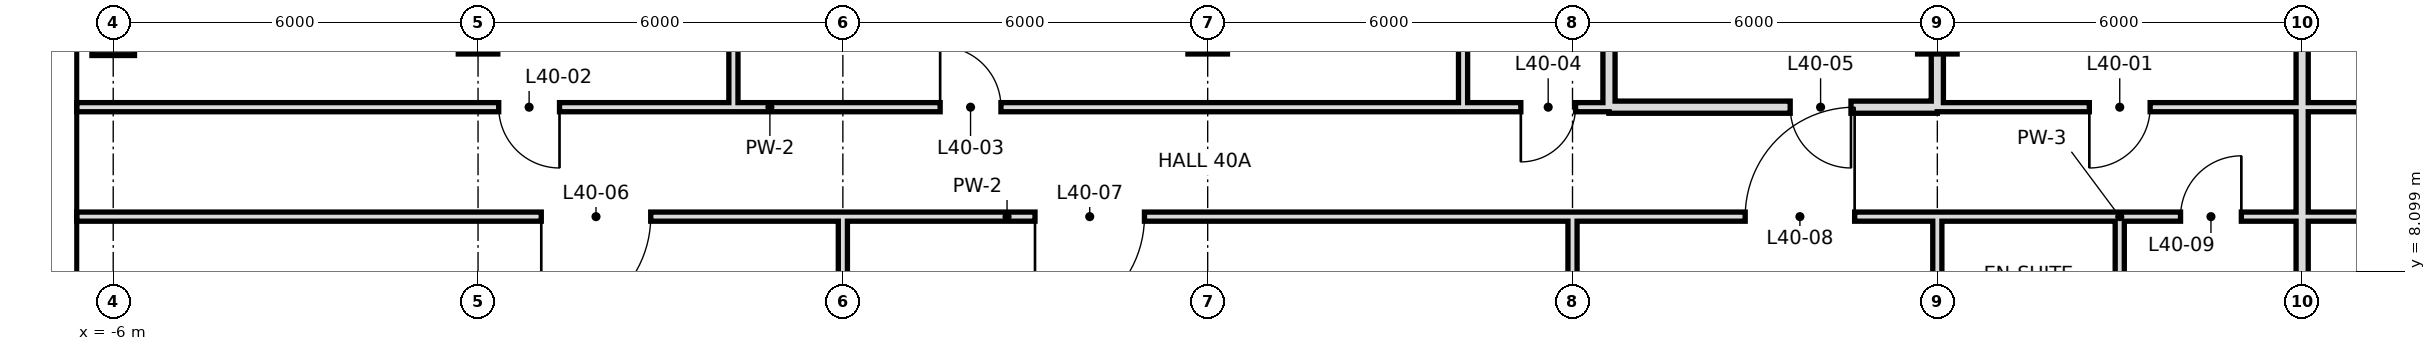
"""IFC4 building model, lengths in metres.
Left out: names, types, materials, properties, quantities, classifications, styles, units other than length and angle.
Written with IfcOpenShell. Run it as: python <this file> out.ifc"""

import sys

from ifc_helpers import new_model, si_unit, direction, frame, frame_2d, origin, origin_2d, place, context, subcontext, project, spatial, rectangle, hollow_rectangle, extrude, element, fill, save


model = new_model("IFC4")
c1 = context("Model", 3, precision=1e-05, world=origin(), true_north=direction((0.0, 1.0)))
c2 = subcontext(c1, "Body", "Model", "MODEL_VIEW")
j1 = project(units=[si_unit("LENGTHUNIT", "METRE"), si_unit("PLANEANGLEUNIT", "RADIAN")], contexts=[c1])
p1 = place(None, origin())
s1 = spatial("IfcSite", under=j1, at=p1, CompositionType="ELEMENT")
p2 = place(p1, origin())
s2 = spatial("IfcBuilding", under=s1, at=p2, CompositionType="ELEMENT")
p3 = place(p2, frame((0.0, 0.0, 174.4)))
s3 = spatial("IfcBuildingStorey", under=s2, at=p3, CompositionType="ELEMENT", Elevation=174.4)
p4 = place(p3, frame((-6.0, 12.0, 0.0), z_axis=(0.0, 0.0, 1.0), x_axis=(1.0, 0.0, 0.0)))
e1 = element("IfcColumn", 1, at=p4, inside=s3, PredefinedType="COLUMN", context=c2, shape_type="SweptSolid", body=[
    extrude(hollow_rectangle(XDim=0.7, YDim=0.7, WallThickness=0.036, at=origin_2d()), origin(), (0.0, 0.0, 1.0), 3.6),
])
for number, where, z_axis, x_axis in (
    (2, (0.0, 12.0, 0.0), (0.0, 0.0, 1.0), (1.0, 0.0, 0.0)),
    (3, (12.0, 12.0, 0.0), (0.0, 0.0, 1.0), (1.0, 0.0, 0.0)),
    (4, (24.0, 12.0, 0.0), (0.0, 0.0, 1.0), (1.0, 0.0, 0.0)),
):
    element("IfcColumn", number, at=place(p3, frame(where, z_axis=z_axis, x_axis=x_axis)), inside=s3, PredefinedType="COLUMN", context=c2, shape_type="SweptSolid", body=[
        extrude(hollow_rectangle(XDim=0.65, YDim=0.65, WallThickness=0.032, at=origin_2d()), origin(), (0.0, 0.0, 1.0), 3.6),
    ])
p5 = place(p3, frame((16.2, 10.8, 0.0), z_axis=(0.0, 0.0, 1.0), x_axis=(0.0, 1.0, 0.0)))
e5 = element("IfcWall", 5, at=p5, inside=s3, PredefinedType="PARTITIONING", context=c2, shape_type="SweptSolid", body=[
    extrude(rectangle(XDim=4.5, YDim=0.15, at=frame_2d((2.25, 0.0))), origin(), (0.0, 0.0, 1.0), 3.42),
])
p6 = place(p3, frame((18.0, -0.6, 0.0), z_axis=(0.0, 0.0, 1.0), x_axis=(0.0, 1.0, 0.0)))
e6 = element("IfcWall", 6, at=p6, inside=s3, PredefinedType="PARTITIONING", context=c2, shape_type="SweptSolid", body=[
    extrude(rectangle(XDim=9.6, YDim=0.15, at=frame_2d((4.8, 0.0))), origin(), (0.0, 0.0, 1.0), 2.72),
])
for number, where, z_axis, x_axis in (
    (7, (18.6, 10.8, 0.0), (0.0, 0.0, 1.0), (0.0, 1.0, 0.0)),
    (8, (24.0, 10.8, 0.0), (0.0, 0.0, 1.0), (0.0, 1.0, 0.0)),
):
    element("IfcWall", number, at=place(p3, frame(where, z_axis=z_axis, x_axis=x_axis)), inside=s3, PredefinedType="SOLIDWALL", context=c2, shape_type="SweptSolid", body=[
        extrude(rectangle(XDim=4.5, YDim=0.2, at=frame_2d((2.25, 0.0))), origin(), (0.0, 0.0, 1.0), 2.72),
    ])
p7 = place(p3, frame((24.0, 6.0, 0.0), z_axis=(0.0, 0.0, 1.0), x_axis=(0.0, 1.0, 0.0)))
e9 = element("IfcWall", 9, at=p7, inside=s3, PredefinedType="PARTITIONING", context=c2, shape_type="SweptSolid", body=[
    extrude(rectangle(XDim=3.0, YDim=0.15, at=frame_2d((1.5, 0.0))), origin(), (0.0, 0.0, 1.0), 2.72),
])
p8 = place(p3, frame((27.0, 6.0, 0.0), z_axis=(0.0, 0.0, 1.0), x_axis=(0.0, 1.0, 0.0)))
e10 = element("IfcWall", 10, at=p8, inside=s3, PredefinedType="PARTITIONING", context=c2, shape_type="SweptSolid", body=[
    extrude(rectangle(XDim=3.0, YDim=0.15, at=frame_2d((1.5, 0.0))), origin(), (0.0, 0.0, 1.0), 3.42),
])
p9 = place(p3, frame((30.0, -0.6, 0.0), z_axis=(0.0, 0.0, 1.0), x_axis=(0.0, 1.0, 0.0)))
e11 = element("IfcWall", 11, at=p9, inside=s3, PredefinedType="SOLIDWALL", context=c2, shape_type="SweptSolid", body=[
    extrude(rectangle(XDim=15.9, YDim=0.2, at=frame_2d((7.95, 0.0))), origin(), (0.0, 0.0, 1.0), 2.72),
])
p10 = place(p3, frame((4.2, 10.8, 0.0), z_axis=(0.0, 0.0, 1.0), x_axis=(0.0, 1.0, 0.0)))
e12 = element("IfcWall", 12, at=p10, inside=s3, PredefinedType="PARTITIONING", context=c2, shape_type="SweptSolid", body=[
    extrude(rectangle(XDim=4.5, YDim=0.15, at=frame_2d((2.25, 0.0))), origin(), (0.0, 0.0, 1.0), 3.42),
])
p11 = place(p3, frame((6.0, -0.6, 0.0), z_axis=(0.0, 0.0, 1.0), x_axis=(0.0, 1.0, 0.0)))
e13 = element("IfcWall", 13, at=p11, inside=s3, PredefinedType="PARTITIONING", context=c2, shape_type="SweptSolid", body=[
    extrude(rectangle(XDim=9.6, YDim=0.15, at=frame_2d((4.8, 0.0))), origin(), (0.0, 0.0, 1.0), 2.72),
])
p12 = place(p3, frame((18.6, 10.8, 0.0), z_axis=(0.0, 0.0, 1.0), x_axis=(1.0, 0.0, 0.0)))
e14 = element("IfcWall", 14, at=p12, inside=s3, PredefinedType="SOLIDWALL", context=c2, shape_type="SweptSolid", body=[
    extrude(rectangle(XDim=5.4, YDim=0.2, at=frame_2d((2.7, 0.0))), origin(), (0.0, 0.0, 1.0), 2.72),
])
p13 = place(p12, frame((2.98, 0.0, 0.0)))
e15 = element("IfcOpeningElement", 15, at=p13, cuts=e14, PredefinedType="OPENING", context=c2, shape_type="SweptSolid", body=[
    extrude(rectangle(XDim=1.0, YDim=2.4, at=frame_2d((0.5, 1.2))), frame((0.0, 0.11, 0.0), z_axis=(0.0, -1.0, 0.0), x_axis=(1.0, 0.0, 0.0)), (0.0, 0.0, 1.0), 0.22),
])
p14 = place(p3, frame((-6.6, 10.8, 0.0), z_axis=(0.0, 0.0, 1.0), x_axis=(1.0, 0.0, 0.0)))
e16 = element("IfcWall", 16, at=p14, inside=s3, PredefinedType="PARTITIONING", context=c2, shape_type="SweptSolid", body=[
    extrude(rectangle(XDim=22.8, YDim=0.15, at=frame_2d((11.4, 0.0))), origin(), (0.0, 0.0, 1.0), 3.42),
])
p15 = place(p14, frame((6.94, 0.0, 0.0)))
e17 = element("IfcOpeningElement", 17, at=p15, cuts=e16, PredefinedType="OPENING", context=c2, shape_type="SweptSolid", body=[
    extrude(rectangle(XDim=1.0, YDim=2.4, at=frame_2d((0.5, 1.2))), frame((0.0, 0.085, 0.0), z_axis=(0.0, -1.0, 0.0), x_axis=(1.0, 0.0, 0.0)), (0.0, 0.0, 1.0), 0.17),
])
p16 = place(p14, frame((14.2, 0.0, 0.0)))
e18 = element("IfcOpeningElement", 18, at=p16, cuts=e16, PredefinedType="OPENING", context=c2, shape_type="SweptSolid", body=[
    extrude(rectangle(XDim=1.0, YDim=2.4, at=frame_2d((0.5, 1.2))), frame((0.0, 0.085, 0.0), z_axis=(0.0, -1.0, 0.0), x_axis=(1.0, 0.0, 0.0)), (0.0, 0.0, 1.0), 0.17),
])
p17 = place(p3, frame((24.0, 10.8, 0.0), z_axis=(0.0, 0.0, 1.0), x_axis=(1.0, 0.0, 0.0)))
e19 = element("IfcWall", 19, at=p17, inside=s3, PredefinedType="PARTITIONING", context=c2, shape_type="SweptSolid", body=[
    extrude(rectangle(XDim=19.8, YDim=0.15, at=frame_2d((9.9, 0.0))), origin(), (0.0, 0.0, 1.0), 3.42),
])
p18 = place(p17, frame((2.5, 0.0, 0.0)))
e20 = element("IfcOpeningElement", 20, at=p18, cuts=e19, PredefinedType="OPENING", context=c2, shape_type="SweptSolid", body=[
    extrude(rectangle(XDim=1.0, YDim=2.4, at=frame_2d((0.5, 1.2))), frame((0.0, 0.085, 0.0), z_axis=(0.0, -1.0, 0.0), x_axis=(1.0, 0.0, 0.0)), (0.0, 0.0, 1.0), 0.17),
])
p19 = place(p17, frame((8.56, 0.0, 0.0)))
e21 = element("IfcOpeningElement", 21, at=p19, cuts=e19, PredefinedType="OPENING", context=c2, shape_type="SweptSolid", body=[
    extrude(rectangle(XDim=1.0, YDim=2.4, at=frame_2d((0.5, 1.2))), frame((0.0, 0.085, 0.0), z_axis=(0.0, -1.0, 0.0), x_axis=(1.0, 0.0, 0.0)), (0.0, 0.0, 1.0), 0.17),
])
p20 = place(p17, frame((16.3, 0.0, 0.0)))
e22 = element("IfcOpeningElement", 22, at=p20, cuts=e19, PredefinedType="OPENING", context=c2, shape_type="SweptSolid", body=[
    extrude(rectangle(XDim=1.0, YDim=2.4, at=frame_2d((0.5, 1.2))), frame((0.0, 0.085, 0.0), z_axis=(0.0, -1.0, 0.0), x_axis=(1.0, 0.0, 0.0)), (0.0, 0.0, 1.0), 0.17),
])
p21 = place(p3, frame((16.2, 10.8, 0.0), z_axis=(0.0, 0.0, 1.0), x_axis=(1.0, 0.0, 0.0)))
e23 = element("IfcWall", 23, at=p21, inside=s3, PredefinedType="PARTITIONING", context=c2, shape_type="SweptSolid", body=[
    extrude(rectangle(XDim=2.4, YDim=0.15, at=frame_2d((1.2, 0.0))), origin(), (0.0, 0.0, 1.0), 3.42),
])
p22 = place(p21, frame((0.95, 0.0, 0.0)))
e24 = element("IfcOpeningElement", 24, at=p22, cuts=e23, PredefinedType="OPENING", context=c2, shape_type="SweptSolid", body=[
    extrude(rectangle(XDim=0.9, YDim=2.4, at=frame_2d((0.45, 1.2))), frame((0.0, 0.085, 0.0), z_axis=(0.0, -1.0, 0.0), x_axis=(1.0, 0.0, 0.0)), (0.0, 0.0, 1.0), 0.17),
])
p23 = place(p3, frame((-6.6, 9.0, 0.0), z_axis=(0.0, 0.0, 1.0), x_axis=(1.0, 0.0, 0.0)))
e25 = element("IfcWall", 25, at=p23, inside=s3, PredefinedType="PARTITIONING", context=c2, shape_type="SweptSolid", body=[
    extrude(rectangle(XDim=30.6, YDim=0.15, at=frame_2d((15.3, 0.0))), origin(), (0.0, 0.0, 1.0), 3.42),
])
p24 = place(p23, frame((7.64, 0.0, 0.0)))
e26 = element("IfcOpeningElement", 26, at=p24, cuts=e25, PredefinedType="OPENING", context=c2, shape_type="SweptSolid", body=[
    extrude(rectangle(XDim=1.8, YDim=2.4, at=frame_2d((0.9, 1.2))), frame((0.0, 0.085, 0.0), z_axis=(0.0, -1.0, 0.0), x_axis=(1.0, 0.0, 0.0)), (0.0, 0.0, 1.0), 0.17),
])
p25 = place(p23, frame((15.76, 0.0, 0.0)))
e27 = element("IfcOpeningElement", 27, at=p25, cuts=e25, PredefinedType="OPENING", context=c2, shape_type="SweptSolid", body=[
    extrude(rectangle(XDim=1.8, YDim=2.4, at=frame_2d((0.9, 1.2))), frame((0.0, 0.085, 0.0), z_axis=(0.0, -1.0, 0.0), x_axis=(1.0, 0.0, 0.0)), (0.0, 0.0, 1.0), 0.17),
])
p26 = place(p23, frame((27.44, 0.0, 0.0)))
e28 = element("IfcOpeningElement", 28, at=p26, cuts=e25, PredefinedType="OPENING", context=c2, shape_type="SweptSolid", body=[
    extrude(rectangle(XDim=1.8, YDim=2.4, at=frame_2d((0.9, 1.2))), frame((0.0, 0.085, 0.0), z_axis=(0.0, -1.0, 0.0), x_axis=(1.0, 0.0, 0.0)), (0.0, 0.0, 1.0), 0.17),
])
p27 = place(p3, frame((27.0, 9.0, 0.0), z_axis=(0.0, 0.0, 1.0), x_axis=(1.0, 0.0, 0.0)))
e29 = element("IfcWall", 29, at=p27, inside=s3, PredefinedType="PARTITIONING", context=c2, shape_type="SweptSolid", body=[
    extrude(rectangle(XDim=15.0, YDim=0.15, at=frame_2d((7.5, 0.0))), origin(), (0.0, 0.0, 1.0), 3.42),
])
p28 = place(p27, frame((1.0, 0.0, 0.0)))
e30 = element("IfcOpeningElement", 30, at=p28, cuts=e29, PredefinedType="OPENING", context=c2, shape_type="SweptSolid", body=[
    extrude(rectangle(XDim=1.0, YDim=2.4, at=frame_2d((0.5, 1.2))), frame((0.0, 0.085, 0.0), z_axis=(0.0, -1.0, 0.0), x_axis=(1.0, 0.0, 0.0)), (0.0, 0.0, 1.0), 0.17),
])
p29 = place(p27, frame((6.16, 0.0, 0.0)))
e31 = element("IfcOpeningElement", 31, at=p29, cuts=e29, PredefinedType="OPENING", context=c2, shape_type="SweptSolid", body=[
    extrude(rectangle(XDim=1.8, YDim=2.4, at=frame_2d((0.9, 1.2))), frame((0.0, 0.085, 0.0), z_axis=(0.0, -1.0, 0.0), x_axis=(1.0, 0.0, 0.0)), (0.0, 0.0, 1.0), 0.17),
])
p30 = place(p3, frame((24.0, 9.0, 0.0), z_axis=(0.0, 0.0, 1.0), x_axis=(1.0, 0.0, 0.0)))
e32 = element("IfcWall", 32, at=p30, inside=s3, PredefinedType="PARTITIONING", context=c2, shape_type="SweptSolid", body=[
    extrude(rectangle(XDim=3.0, YDim=0.15, at=frame_2d((1.5, 0.0))), origin(), (0.0, 0.0, 1.0), 3.42),
])
p31 = place(p18, frame((1.0, 0.0, 0.0), z_axis=(0.0, 0.0, 1.0), x_axis=(-1.0, 0.0, 0.0)))
e33 = element("IfcDoor", 33, at=p31, inside=s3, OperationType="SINGLE_SWING_RIGHT", PredefinedType="DOOR", context=c2, shape_type="SweptSolid", body=[
    extrude(rectangle(XDim=1.0, YDim=2.4, at=frame_2d((0.5, 1.2))), frame((0.0, 0.025, 0.0), z_axis=(0.0, -1.0, 0.0), x_axis=(1.0, 0.0, 0.0)), (0.0, 0.0, 1.0), 0.05),
])
fill(e20, e33)
p32 = place(p15, origin())
e34 = element("IfcDoor", 34, at=p32, inside=s3, OperationType="SINGLE_SWING_RIGHT", PredefinedType="DOOR", context=c2, shape_type="SweptSolid", body=[
    extrude(rectangle(XDim=1.0, YDim=2.4, at=frame_2d((0.5, 1.2))), frame((0.0, 0.025, 0.0), z_axis=(0.0, -1.0, 0.0), x_axis=(1.0, 0.0, 0.0)), (0.0, 0.0, 1.0), 0.05),
])
fill(e17, e34)
p33 = place(p16, origin())
e35 = element("IfcDoor", 35, at=p33, inside=s3, OperationType="SINGLE_SWING_LEFT", PredefinedType="DOOR", context=c2, shape_type="SweptSolid", body=[
    extrude(rectangle(XDim=1.0, YDim=2.4, at=frame_2d((0.5, 1.2))), frame((0.0, 0.025, 0.0), z_axis=(0.0, -1.0, 0.0), x_axis=(1.0, 0.0, 0.0)), (0.0, 0.0, 1.0), 0.05),
])
fill(e18, e35)
p34 = place(p22, frame((0.9, 0.0, 0.0), z_axis=(0.0, 0.0, 1.0), x_axis=(-1.0, 0.0, 0.0)))
e36 = element("IfcDoor", 36, at=p34, inside=s3, OperationType="SINGLE_SWING_RIGHT", PredefinedType="DOOR", context=c2, shape_type="SweptSolid", body=[
    extrude(rectangle(XDim=0.9, YDim=2.4, at=frame_2d((0.45, 1.2))), frame((0.0, 0.025, 0.0), z_axis=(0.0, -1.0, 0.0), x_axis=(1.0, 0.0, 0.0)), (0.0, 0.0, 1.0), 0.05),
])
fill(e24, e36)
p35 = place(p13, origin())
e37 = element("IfcDoor", 37, at=p35, inside=s3, OperationType="SINGLE_SWING_RIGHT", PredefinedType="DOOR", context=c2, shape_type="SweptSolid", body=[
    extrude(rectangle(XDim=1.0, YDim=2.4, at=frame_2d((0.5, 1.2))), frame((0.0, 0.025, 0.0), z_axis=(0.0, -1.0, 0.0), x_axis=(1.0, 0.0, 0.0)), (0.0, 0.0, 1.0), 0.05),
])
fill(e15, e37)
p36 = place(p24, frame((1.8, 0.0, 0.0), z_axis=(0.0, 0.0, 1.0), x_axis=(-1.0, 0.0, 0.0)))
e38 = element("IfcDoor", 38, at=p36, inside=s3, OperationType="SINGLE_SWING_RIGHT", PredefinedType="DOOR", context=c2, shape_type="SweptSolid", body=[
    extrude(rectangle(XDim=1.8, YDim=2.4, at=frame_2d((0.9, 1.2))), frame((0.0, 0.025, 0.0), z_axis=(0.0, -1.0, 0.0), x_axis=(1.0, 0.0, 0.0)), (0.0, 0.0, 1.0), 0.05),
])
fill(e26, e38)
p37 = place(p25, frame((1.8, 0.0, 0.0), z_axis=(0.0, 0.0, 1.0), x_axis=(-1.0, 0.0, 0.0)))
e39 = element("IfcDoor", 39, at=p37, inside=s3, OperationType="SINGLE_SWING_RIGHT", PredefinedType="DOOR", context=c2, shape_type="SweptSolid", body=[
    extrude(rectangle(XDim=1.8, YDim=2.4, at=frame_2d((0.9, 1.2))), frame((0.0, 0.025, 0.0), z_axis=(0.0, -1.0, 0.0), x_axis=(1.0, 0.0, 0.0)), (0.0, 0.0, 1.0), 0.05),
])
fill(e27, e39)
p38 = place(p26, frame((1.8, 0.0, 0.0), z_axis=(0.0, 0.0, 1.0), x_axis=(-1.0, 0.0, 0.0)))
e40 = element("IfcDoor", 40, at=p38, inside=s3, OperationType="SINGLE_SWING_LEFT", PredefinedType="DOOR", context=c2, shape_type="SweptSolid", body=[
    extrude(rectangle(XDim=1.8, YDim=2.4, at=frame_2d((0.9, 1.2))), frame((0.0, 0.025, 0.0), z_axis=(0.0, -1.0, 0.0), x_axis=(1.0, 0.0, 0.0)), (0.0, 0.0, 1.0), 0.05),
])
fill(e28, e40)
p39 = place(p28, frame((1.0, 0.0, 0.0), z_axis=(0.0, 0.0, 1.0), x_axis=(-1.0, 0.0, 0.0)))
e41 = element("IfcDoor", 41, at=p39, inside=s3, OperationType="SINGLE_SWING_LEFT", PredefinedType="DOOR", context=c2, shape_type="SweptSolid", body=[
    extrude(rectangle(XDim=1.0, YDim=2.4, at=frame_2d((0.5, 1.2))), frame((0.0, 0.025, 0.0), z_axis=(0.0, -1.0, 0.0), x_axis=(1.0, 0.0, 0.0)), (0.0, 0.0, 1.0), 0.05),
])
fill(e30, e41)
save(model, sys.argv[1])
